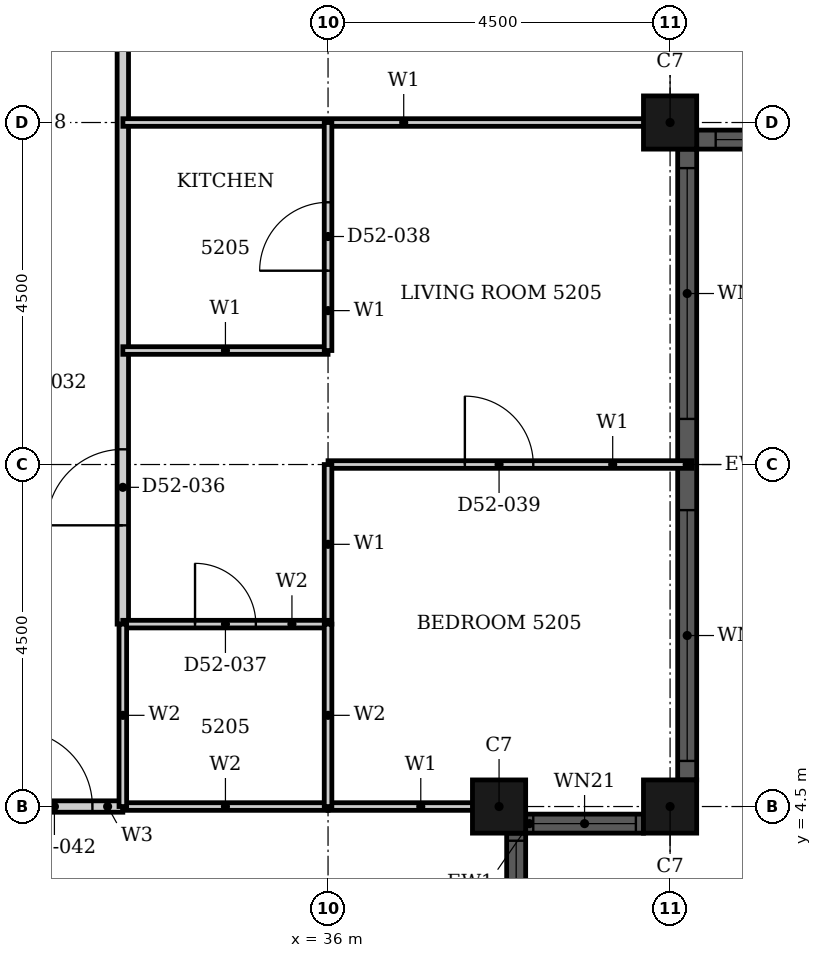
"""IFC4 building model, lengths in metres.
Left out: names, types, materials, properties, quantities, classifications, styles, units other than length and angle.
Written with IfcOpenShell. Run it as: python <this file> out.ifc"""

import sys

from ifc_helpers import new_model, si_unit, direction, frame, frame_2d, origin, origin_2d, place, context, subcontext, project, spatial, rectangle, hollow_rectangle, extrude, element, fill, save


model = new_model("IFC4")
c1 = context("Model", 3, precision=1e-05, world=origin(), true_north=direction((0.0, 1.0)))
c2 = subcontext(c1, "Body", "Model", "MODEL_VIEW")
j1 = project(units=[si_unit("LENGTHUNIT", "METRE"), si_unit("PLANEANGLEUNIT", "RADIAN")], contexts=[c1])
p1 = place(None, origin())
s1 = spatial("IfcSite", under=j1, at=p1, CompositionType="ELEMENT")
p2 = place(p1, origin())
s2 = spatial("IfcBuilding", under=s1, at=p2, CompositionType="ELEMENT")
p3 = place(p2, frame((0.0, 0.0, 207.2)))
s3 = spatial("IfcBuildingStorey", under=s2, at=p3, CompositionType="ELEMENT", Elevation=207.2)
for number, where, z_axis, x_axis in (
    (1, (40.5, 13.5, 0.0), (0.0, 0.0, 1.0), (1.0, 0.0, 0.0)),
    (2, (38.25, 4.5, 0.0), (0.0, 0.0, 1.0), (1.0, 0.0, 0.0)),
    (3, (40.5, 4.5, 0.0), (0.0, 0.0, 1.0), (1.0, 0.0, 0.0)),
):
    element("IfcColumn", number, at=place(p3, frame(where, z_axis=z_axis, x_axis=x_axis)), inside=s3, PredefinedType="COLUMN", context=c2, shape_type="SweptSolid", body=[
        extrude(hollow_rectangle(XDim=0.7, YDim=0.7, WallThickness=0.022, at=origin_2d()), origin(), (0.0, 0.0, 1.0), 3.7),
    ])
p4 = place(p3, frame((40.85, 13.275, 0.0), z_axis=(0.0, 0.0, 1.0), x_axis=(1.0, 0.0, 0.0)))
e4 = element("IfcWall", 4, at=p4, inside=s3, PredefinedType="SOLIDWALL", context=c2, shape_type="SweptSolid", body=[
    extrude(rectangle(XDim=3.8, YDim=0.25, at=frame_2d((1.9, 0.0))), origin(), (0.0, 0.0, 1.0), 3.7),
])
p5 = place(p4, frame((0.25, 0.0, 0.45)))
e5 = element("IfcOpeningElement", 5, at=p5, cuts=e4, PredefinedType="OPENING", context=c2, shape_type="SweptSolid", body=[
    extrude(rectangle(XDim=3.3, YDim=2.3, at=frame_2d((1.65, 1.15))), frame((0.0, 0.135, 0.0), z_axis=(0.0, -1.0, 0.0), x_axis=(1.0, 0.0, 0.0)), (0.0, 0.0, 1.0), 0.27),
])
p6 = place(p3, frame((38.475, 2.6, 0.0), z_axis=(0.0, 0.0, 1.0), x_axis=(0.0, 1.0, 0.0)))
e6 = element("IfcWall", 6, at=p6, inside=s3, PredefinedType="SOLIDWALL", context=c2, shape_type="SweptSolid", body=[
    extrude(rectangle(XDim=1.55, YDim=0.25, at=frame_2d((0.775, 0.0))), origin(), (0.0, 0.0, 1.0), 3.7),
])
p7 = place(p6, frame((0.1, 0.0, 0.9)))
e7 = element("IfcOpeningElement", 7, at=p7, cuts=e6, PredefinedType="OPENING", context=c2, shape_type="SweptSolid", body=[
    extrude(rectangle(XDim=1.35, YDim=1.85, at=frame_2d((0.675, 0.925))), frame((0.0, 0.135, 0.0), z_axis=(0.0, -1.0, 0.0), x_axis=(1.0, 0.0, 0.0)), (0.0, 0.0, 1.0), 0.27),
])
p8 = place(p3, frame((38.6, 4.275, 0.0), z_axis=(0.0, 0.0, 1.0), x_axis=(1.0, 0.0, 0.0)))
e8 = element("IfcWall", 8, at=p8, inside=s3, PredefinedType="SOLIDWALL", context=c2, shape_type="SweptSolid", body=[
    extrude(rectangle(XDim=1.55, YDim=0.25, at=frame_2d((0.775, 0.0))), origin(), (0.0, 0.0, 1.0), 3.7),
])
p9 = place(p8, frame((0.1, 0.0, 0.9)))
e9 = element("IfcOpeningElement", 9, at=p9, cuts=e8, PredefinedType="OPENING", context=c2, shape_type="SweptSolid", body=[
    extrude(rectangle(XDim=1.35, YDim=1.85, at=frame_2d((0.675, 0.925))), frame((0.0, 0.135, 0.0), z_axis=(0.0, -1.0, 0.0), x_axis=(1.0, 0.0, 0.0)), (0.0, 0.0, 1.0), 0.27),
])
p10 = place(p3, frame((40.725, 4.85, 0.0), z_axis=(0.0, 0.0, 1.0), x_axis=(0.0, 1.0, 0.0)))
e10 = element("IfcWall", 10, at=p10, inside=s3, PredefinedType="SOLIDWALL", context=c2, shape_type="SweptSolid", body=[
    extrude(rectangle(XDim=8.3, YDim=0.25, at=frame_2d((4.15, 0.0))), origin(), (0.0, 0.0, 1.0), 3.7),
])
p11 = place(p10, frame((0.25, 0.0, 0.45)))
e11 = element("IfcOpeningElement", 11, at=p11, cuts=e10, PredefinedType="OPENING", context=c2, shape_type="SweptSolid", body=[
    extrude(rectangle(XDim=3.3, YDim=2.3, at=frame_2d((1.65, 1.15))), frame((0.0, 0.135, 0.0), z_axis=(0.0, -1.0, 0.0), x_axis=(1.0, 0.0, 0.0)), (0.0, 0.0, 1.0), 0.27),
])
p12 = place(p10, frame((4.75, 0.0, 0.45)))
e12 = element("IfcOpeningElement", 12, at=p12, cuts=e10, PredefinedType="OPENING", context=c2, shape_type="SweptSolid", body=[
    extrude(rectangle(XDim=3.3, YDim=2.3, at=frame_2d((1.65, 1.15))), frame((0.0, 0.135, 0.0), z_axis=(0.0, -1.0, 0.0), x_axis=(1.0, 0.0, 0.0)), (0.0, 0.0, 1.0), 0.27),
])
p13 = place(p3, frame((31.5, 4.5, 0.0), z_axis=(0.0, 0.0, 1.0), x_axis=(1.0, 0.0, 0.0)))
e13 = element("IfcWall", 13, at=p13, inside=s3, PredefinedType="PARTITIONING", context=c2, shape_type="SweptSolid", body=[
    extrude(rectangle(XDim=1.8, YDim=0.15, at=frame_2d((0.9, 0.0))), origin(), (0.0, 0.0, 1.0), 3.4),
])
p14 = place(p13, frame((0.4, 0.0, 0.0)))
e14 = element("IfcOpeningElement", 14, at=p14, cuts=e13, PredefinedType="OPENING", context=c2, shape_type="SweptSolid", body=[
    extrude(rectangle(XDim=1.0, YDim=2.1, at=frame_2d((0.5, 1.05))), frame((0.0, 0.085, 0.0), z_axis=(0.0, -1.0, 0.0), x_axis=(1.0, 0.0, 0.0)), (0.0, 0.0, 1.0), 0.17),
])
p15 = place(p3, frame((33.3, 6.9, 0.0), z_axis=(0.0, 0.0, 1.0), x_axis=(0.0, 1.0, 0.0)))
e15 = element("IfcWall", 15, at=p15, inside=s3, PredefinedType="PARTITIONING", context=c2, shape_type="SweptSolid", body=[
    extrude(rectangle(XDim=13.799, YDim=0.15, at=frame_2d((6.899, 0.0))), origin(), (0.0, 0.0, 1.0), 3.4),
])
p16 = place(p15, frame((1.3, 0.0, 0.0)))
e16 = element("IfcOpeningElement", 16, at=p16, cuts=e15, PredefinedType="OPENING", context=c2, shape_type="SweptSolid", body=[
    extrude(rectangle(XDim=1.0, YDim=2.2, at=frame_2d((0.5, 1.1))), frame((0.0, 0.085, 0.0), z_axis=(0.0, -1.0, 0.0), x_axis=(1.0, 0.0, 0.0)), (0.0, 0.0, 1.0), 0.17),
])
p17 = place(p3, frame((33.3, 10.5, 0.0), z_axis=(0.0, 0.0, 1.0), x_axis=(1.0, 0.0, 0.0)))
e17 = element("IfcWall", 17, at=p17, inside=s3, PredefinedType="PARTITIONING", context=c2, shape_type="SweptSolid", body=[
    extrude(rectangle(XDim=2.7, YDim=0.1, at=frame_2d((1.35, 0.0))), origin(), (0.0, 0.0, 1.0), 3.4),
])
p18 = place(p3, frame((33.301, 13.5, 0.0), z_axis=(0.0, 0.0, 1.0), x_axis=(1.0, 0.0, 0.0)))
e18 = element("IfcWall", 18, at=p18, inside=s3, PredefinedType="PARTITIONING", context=c2, shape_type="SweptSolid", body=[
    extrude(rectangle(XDim=7.389, YDim=0.1, at=frame_2d((3.694, 0.0))), origin(), (0.0, 0.0, 1.0), 2.48),
])
p19 = place(p3, frame((36.0, 4.5, 0.0), z_axis=(0.0, 0.0, 1.0), x_axis=(1.0, 0.0, 0.0)))
e19 = element("IfcWall", 19, at=p19, inside=s3, PredefinedType="PARTITIONING", context=c2, shape_type="SweptSolid", body=[
    extrude(rectangle(XDim=2.44, YDim=0.1, at=frame_2d((1.22, 0.0))), origin(), (0.0, 0.0, 1.0), 3.4),
])
p20 = place(p3, frame((36.0, 9.0, 0.0), z_axis=(0.0, 0.0, 1.0), x_axis=(1.0, 0.0, 0.0)))
e20 = element("IfcWall", 20, at=p20, inside=s3, PredefinedType="PARTITIONING", context=c2, shape_type="SweptSolid", body=[
    extrude(rectangle(XDim=4.79, YDim=0.1, at=frame_2d((2.395, 0.0))), origin(), (0.0, 0.0, 1.0), 3.4),
])
p21 = place(p20, frame((1.8, 0.0, 0.0)))
e21 = element("IfcOpeningElement", 21, at=p21, cuts=e20, PredefinedType="OPENING", context=c2, shape_type="SweptSolid", body=[
    extrude(rectangle(XDim=0.9, YDim=2.1, at=frame_2d((0.45, 1.05))), frame((0.0, 0.06, 0.0), z_axis=(0.0, -1.0, 0.0), x_axis=(1.0, 0.0, 0.0)), (0.0, 0.0, 1.0), 0.12),
])
p22 = place(p3, frame((36.0, 6.9, 0.0), z_axis=(0.0, 0.0, 1.0), x_axis=(0.0, 1.0, 0.0)))
e22 = element("IfcWall", 22, at=p22, inside=s3, PredefinedType="PARTITIONING", context=c2, shape_type="SweptSolid", body=[
    extrude(rectangle(XDim=2.1, YDim=0.1, at=frame_2d((1.05, 0.0))), origin(), (0.0, 0.0, 1.0), 2.68),
])
p23 = place(p3, frame((36.0, 10.5, 0.0), z_axis=(0.0, 0.0, 1.0), x_axis=(0.0, 1.0, 0.0)))
e23 = element("IfcWall", 23, at=p23, inside=s3, PredefinedType="PARTITIONING", context=c2, shape_type="SweptSolid", body=[
    extrude(rectangle(XDim=3.0, YDim=0.1, at=frame_2d((1.5, 0.0))), origin(), (0.0, 0.0, 1.0), 2.68),
])
p24 = place(p23, frame((1.05, 0.0, 0.0)))
e24 = element("IfcOpeningElement", 24, at=p24, cuts=e23, PredefinedType="OPENING", context=c2, shape_type="SweptSolid", body=[
    extrude(rectangle(XDim=0.9, YDim=2.1, at=frame_2d((0.45, 1.05))), frame((0.0, 0.06, 0.0), z_axis=(0.0, -1.0, 0.0), x_axis=(1.0, 0.0, 0.0)), (0.0, 0.0, 1.0), 0.12),
])
p25 = place(p3, frame((33.3, 4.5, 0.0), z_axis=(0.0, 0.0, 1.0), x_axis=(1.0, 0.0, 0.0)))
e25 = element("IfcWall", 25, at=p25, inside=s3, PredefinedType="PARTITIONING", context=c2, shape_type="SweptSolid", body=[
    extrude(rectangle(XDim=2.7, YDim=0.1, at=frame_2d((1.35, 0.0))), origin(), (0.0, 0.0, 1.0), 3.4),
])
p26 = place(p3, frame((33.3, 6.9, 0.0), z_axis=(0.0, 0.0, 1.0), x_axis=(1.0, 0.0, 0.0)))
e26 = element("IfcWall", 26, at=p26, inside=s3, PredefinedType="PARTITIONING", context=c2, shape_type="SweptSolid", body=[
    extrude(rectangle(XDim=2.7, YDim=0.1, at=frame_2d((1.35, 0.0))), origin(), (0.0, 0.0, 1.0), 3.4),
])
p27 = place(p26, frame((0.95, 0.0, 0.0)))
e27 = element("IfcOpeningElement", 27, at=p27, cuts=e26, PredefinedType="OPENING", context=c2, shape_type="SweptSolid", body=[
    extrude(rectangle(XDim=0.8, YDim=2.1, at=frame_2d((0.4, 1.05))), frame((0.0, 0.06, 0.0), z_axis=(0.0, -1.0, 0.0), x_axis=(1.0, 0.0, 0.0)), (0.0, 0.0, 1.0), 0.12),
])
p28 = place(p3, frame((33.3, 4.5, 0.0), z_axis=(0.0, 0.0, 1.0), x_axis=(0.0, 1.0, 0.0)))
e28 = element("IfcWall", 28, at=p28, inside=s3, PredefinedType="PARTITIONING", context=c2, shape_type="SweptSolid", body=[
    extrude(rectangle(XDim=2.4, YDim=0.1, at=frame_2d((1.2, 0.0))), origin(), (0.0, 0.0, 1.0), 3.4),
])
p29 = place(p3, frame((36.0, 4.5, 0.0), z_axis=(0.0, 0.0, 1.0), x_axis=(0.0, 1.0, 0.0)))
e29 = element("IfcWall", 29, at=p29, inside=s3, PredefinedType="PARTITIONING", context=c2, shape_type="SweptSolid", body=[
    extrude(rectangle(XDim=2.4, YDim=0.1, at=frame_2d((1.2, 0.0))), origin(), (0.0, 0.0, 1.0), 2.68),
])
p30 = place(p5, origin())
e30 = element("IfcWindow", 30, at=p30, inside=s3, PartitioningType="SINGLE_PANEL", PredefinedType="WINDOW", context=c2, shape_type="SweptSolid", body=[
    extrude(rectangle(XDim=3.3, YDim=2.3, at=frame_2d((1.65, 1.15))), frame((0.0, 0.03, 0.0), z_axis=(0.0, -1.0, 0.0), x_axis=(1.0, 0.0, 0.0)), (0.0, 0.0, 1.0), 0.06),
])
fill(e5, e30)
p31 = place(p7, origin())
e31 = element("IfcWindow", 31, at=p31, inside=s3, PartitioningType="SINGLE_PANEL", PredefinedType="WINDOW", context=c2, shape_type="SweptSolid", body=[
    extrude(rectangle(XDim=1.35, YDim=1.85, at=frame_2d((0.675, 0.925))), frame((0.0, 0.03, 0.0), z_axis=(0.0, -1.0, 0.0), x_axis=(1.0, 0.0, 0.0)), (0.0, 0.0, 1.0), 0.06),
])
fill(e7, e31)
p32 = place(p9, origin())
e32 = element("IfcWindow", 32, at=p32, inside=s3, PartitioningType="SINGLE_PANEL", PredefinedType="WINDOW", context=c2, shape_type="SweptSolid", body=[
    extrude(rectangle(XDim=1.35, YDim=1.85, at=frame_2d((0.675, 0.925))), frame((0.0, 0.03, 0.0), z_axis=(0.0, -1.0, 0.0), x_axis=(1.0, 0.0, 0.0)), (0.0, 0.0, 1.0), 0.06),
])
fill(e9, e32)
p33 = place(p11, origin())
e33 = element("IfcWindow", 33, at=p33, inside=s3, PartitioningType="SINGLE_PANEL", PredefinedType="WINDOW", context=c2, shape_type="SweptSolid", body=[
    extrude(rectangle(XDim=3.3, YDim=2.3, at=frame_2d((1.65, 1.15))), frame((0.0, 0.03, 0.0), z_axis=(0.0, -1.0, 0.0), x_axis=(1.0, 0.0, 0.0)), (0.0, 0.0, 1.0), 0.06),
])
fill(e11, e33)
p34 = place(p12, origin())
e34 = element("IfcWindow", 34, at=p34, inside=s3, PartitioningType="SINGLE_PANEL", PredefinedType="WINDOW", context=c2, shape_type="SweptSolid", body=[
    extrude(rectangle(XDim=3.3, YDim=2.3, at=frame_2d((1.65, 1.15))), frame((0.0, 0.03, 0.0), z_axis=(0.0, -1.0, 0.0), x_axis=(1.0, 0.0, 0.0)), (0.0, 0.0, 1.0), 0.06),
])
fill(e12, e34)
p35 = place(p16, origin())
e35 = element("IfcDoor", 35, at=p35, inside=s3, OperationType="SINGLE_SWING_LEFT", PredefinedType="DOOR", context=c2, shape_type="SweptSolid", body=[
    extrude(rectangle(XDim=1.0, YDim=2.2, at=frame_2d((0.5, 1.1))), frame((0.0, 0.025, 0.0), z_axis=(0.0, -1.0, 0.0), x_axis=(1.0, 0.0, 0.0)), (0.0, 0.0, 1.0), 0.05),
])
fill(e16, e35)
p36 = place(p27, origin())
e36 = element("IfcDoor", 36, at=p36, inside=s3, OperationType="SINGLE_SWING_LEFT", PredefinedType="DOOR", context=c2, shape_type="SweptSolid", body=[
    extrude(rectangle(XDim=0.8, YDim=2.1, at=frame_2d((0.4, 1.05))), frame((0.0, 0.025, 0.0), z_axis=(0.0, -1.0, 0.0), x_axis=(1.0, 0.0, 0.0)), (0.0, 0.0, 1.0), 0.05),
])
fill(e27, e36)
p37 = place(p24, origin())
e37 = element("IfcDoor", 37, at=p37, inside=s3, OperationType="SINGLE_SWING_RIGHT", PredefinedType="DOOR", context=c2, shape_type="SweptSolid", body=[
    extrude(rectangle(XDim=0.9, YDim=2.1, at=frame_2d((0.45, 1.05))), frame((0.0, 0.025, 0.0), z_axis=(0.0, -1.0, 0.0), x_axis=(1.0, 0.0, 0.0)), (0.0, 0.0, 1.0), 0.05),
])
fill(e24, e37)
p38 = place(p21, origin())
e38 = element("IfcDoor", 38, at=p38, inside=s3, OperationType="SINGLE_SWING_LEFT", PredefinedType="DOOR", context=c2, shape_type="SweptSolid", body=[
    extrude(rectangle(XDim=0.9, YDim=2.1, at=frame_2d((0.45, 1.05))), frame((0.0, 0.025, 0.0), z_axis=(0.0, -1.0, 0.0), x_axis=(1.0, 0.0, 0.0)), (0.0, 0.0, 1.0), 0.05),
])
fill(e21, e38)
p39 = place(p14, origin())
e39 = element("IfcDoor", 39, at=p39, inside=s3, OperationType="SINGLE_SWING_RIGHT", PredefinedType="DOOR", context=c2, shape_type="SweptSolid", body=[
    extrude(rectangle(XDim=1.0, YDim=2.1, at=frame_2d((0.5, 1.05))), frame((0.0, 0.025, 0.0), z_axis=(0.0, -1.0, 0.0), x_axis=(1.0, 0.0, 0.0)), (0.0, 0.0, 1.0), 0.05),
])
fill(e14, e39)
save(model, sys.argv[1])
